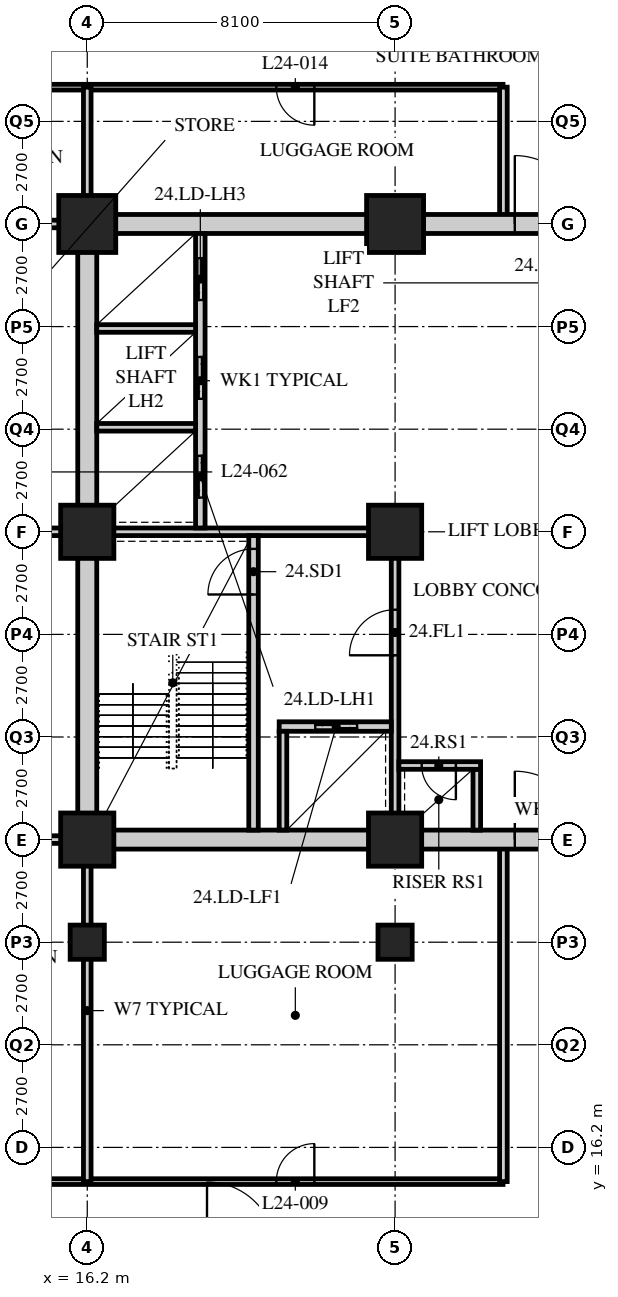
"""IFC4 building model, lengths in metres.
Left out: names, types, materials, properties, quantities, classifications, styles, units other than length and angle.
Written with IfcOpenShell. Run it as: python <this file> out.ifc"""

import sys

from ifc_helpers import new_model, si_unit, direction, frame, frame_2d, origin, origin_2d, place, context, subcontext, project, spatial, rectangle, hollow_rectangle, extrude, element, fill, save


model = new_model("IFC4")
c1 = context("Model", 3, precision=1e-05, world=origin(), true_north=direction((0.0, 1.0)))
c2 = subcontext(c1, "Body", "Model", "MODEL_VIEW")
j1 = project(units=[si_unit("LENGTHUNIT", "METRE"), si_unit("PLANEANGLEUNIT", "RADIAN")], contexts=[c1])
p1 = place(None, origin())
s1 = spatial("IfcSite", under=j1, at=p1, CompositionType="ELEMENT")
p2 = place(p1, origin())
s2 = spatial("IfcBuilding", under=s1, at=p2, CompositionType="ELEMENT")
p3 = place(p2, frame((0.0, 0.0, 98.0)))
s3 = spatial("IfcBuildingStorey", under=s2, at=p3, CompositionType="ELEMENT", Elevation=98.0)
p4 = place(p3, frame((16.2, 21.6, 0.0), z_axis=(0.0, 0.0, 1.0), x_axis=(1.0, 0.0, 0.0)))
e1 = element("IfcColumn", 1, at=p4, inside=s3, PredefinedType="COLUMN", context=c2, shape_type="SweptSolid", body=[
    extrude(hollow_rectangle(XDim=0.9, YDim=0.9, WallThickness=0.1, at=origin_2d()), origin(), (0.0, 0.0, 1.0), 5.4),
])
for number, where, z_axis, x_axis in (
    (2, (16.2, 24.3, 0.0), (0.0, 0.0, 1.0), (1.0, 0.0, 0.0)),
    (3, (16.2, 32.4, 0.0), (0.0, 0.0, 1.0), (1.0, 0.0, 0.0)),
):
    element("IfcColumn", number, at=place(p3, frame(where, z_axis=z_axis, x_axis=x_axis)), inside=s3, PredefinedType="COLUMN", context=c2, shape_type="SweptSolid", body=[
        extrude(hollow_rectangle(XDim=1.4, YDim=1.4, WallThickness=0.12, at=origin_2d()), origin(), (0.0, 0.0, 1.0), 5.4),
    ])
p5 = place(p3, frame((16.2, 40.5, 0.0), z_axis=(0.0, 0.0, 1.0), x_axis=(1.0, 0.0, 0.0)))
e4 = element("IfcColumn", 4, at=p5, inside=s3, PredefinedType="COLUMN", context=c2, shape_type="SweptSolid", body=[
    extrude(hollow_rectangle(XDim=1.5, YDim=1.5, WallThickness=0.13, at=origin_2d()), origin(), (0.0, 0.0, 1.0), 5.4),
])
p6 = place(p3, frame((24.3, 21.6, 0.0), z_axis=(0.0, 0.0, 1.0), x_axis=(1.0, 0.0, 0.0)))
e5 = element("IfcColumn", 5, at=p6, inside=s3, PredefinedType="COLUMN", context=c2, shape_type="SweptSolid", body=[
    extrude(hollow_rectangle(XDim=0.9, YDim=0.9, WallThickness=0.1, at=origin_2d()), origin(), (0.0, 0.0, 1.0), 5.4),
])
for number, where, z_axis, x_axis in (
    (6, (24.3, 24.3, 0.0), (0.0, 0.0, 1.0), (1.0, 0.0, 0.0)),
    (7, (24.3, 32.4, 0.0), (0.0, 0.0, 1.0), (1.0, 0.0, 0.0)),
):
    element("IfcColumn", number, at=place(p3, frame(where, z_axis=z_axis, x_axis=x_axis)), inside=s3, PredefinedType="COLUMN", context=c2, shape_type="SweptSolid", body=[
        extrude(hollow_rectangle(XDim=1.4, YDim=1.4, WallThickness=0.12, at=origin_2d()), origin(), (0.0, 0.0, 1.0), 5.4),
    ])
p7 = place(p3, frame((24.3, 40.5, 0.0), z_axis=(0.0, 0.0, 1.0), x_axis=(1.0, 0.0, 0.0)))
e8 = element("IfcColumn", 8, at=p7, inside=s3, PredefinedType="COLUMN", context=c2, shape_type="SweptSolid", body=[
    extrude(hollow_rectangle(XDim=1.5, YDim=1.5, WallThickness=0.13, at=origin_2d()), origin(), (0.0, 0.0, 1.0), 5.4),
])
p8 = place(p3, frame((27.14, 44.1, 0.0), z_axis=(0.0, 0.0, 1.0), x_axis=(-1.0, 0.0, 0.0)))
e9 = element("IfcWall", 9, at=p8, inside=s3, PredefinedType="PARTITIONING", context=c2, shape_type="SweptSolid", body=[
    extrude(rectangle(XDim=17.24, YDim=0.15, at=frame_2d((8.62, 0.0))), origin(), (0.0, 0.0, 1.0), 5.19),
])
p9 = place(p8, frame((13.59, 0.0, 0.0)))
e10 = element("IfcOpeningElement", 10, at=p9, cuts=e9, PredefinedType="OPENING", context=c2, shape_type="SweptSolid", body=[
    extrude(rectangle(XDim=1.0, YDim=2.1, at=frame_2d((0.5, 1.05))), frame((0.0, 0.085, 0.0), z_axis=(0.0, -1.0, 0.0), x_axis=(1.0, 0.0, 0.0)), (0.0, 0.0, 1.0), 0.17),
])
p10 = place(p8, frame((4.965, 0.0, 0.0)))
e11 = element("IfcOpeningElement", 11, at=p10, cuts=e9, PredefinedType="OPENING", context=c2, shape_type="SweptSolid", body=[
    extrude(rectangle(XDim=1.0, YDim=2.1, at=frame_2d((0.5, 1.05))), frame((0.0, 0.085, 0.0), z_axis=(0.0, -1.0, 0.0), x_axis=(1.0, 0.0, 0.0)), (0.0, 0.0, 1.0), 0.17),
])
p11 = place(p3, frame((9.9, 15.3, 0.0), z_axis=(0.0, 0.0, 1.0), x_axis=(1.0, 0.0, 0.0)))
e12 = element("IfcWall", 12, at=p11, inside=s3, PredefinedType="PARTITIONING", context=c2, shape_type="SweptSolid", body=[
    extrude(rectangle(XDim=17.24, YDim=0.15, at=frame_2d((8.62, 0.0))), origin(), (0.0, 0.0, 1.0), 5.19),
])
p12 = place(p11, frame((2.65, 0.0, 0.0)))
e13 = element("IfcOpeningElement", 13, at=p12, cuts=e12, PredefinedType="OPENING", context=c2, shape_type="SweptSolid", body=[
    extrude(rectangle(XDim=1.0, YDim=2.1, at=frame_2d((0.5, 1.05))), frame((0.0, 0.085, 0.0), z_axis=(0.0, -1.0, 0.0), x_axis=(1.0, 0.0, 0.0)), (0.0, 0.0, 1.0), 0.17),
])
p13 = place(p11, frame((11.275, 0.0, 0.0)))
e14 = element("IfcOpeningElement", 14, at=p13, cuts=e12, PredefinedType="OPENING", context=c2, shape_type="SweptSolid", body=[
    extrude(rectangle(XDim=1.0, YDim=2.1, at=frame_2d((0.5, 1.05))), frame((0.0, 0.085, 0.0), z_axis=(0.0, -1.0, 0.0), x_axis=(1.0, 0.0, 0.0)), (0.0, 0.0, 1.0), 0.17),
])
p14 = place(p3, frame((9.9, 32.4, 0.0), z_axis=(0.0, 0.0, 1.0), x_axis=(1.0, 0.0, 0.0)))
e15 = element("IfcWall", 15, at=p14, inside=s3, PredefinedType="SOLIDWALL", context=c2, shape_type="SweptSolid", body=[
    extrude(rectangle(XDim=6.3, YDim=0.2, at=frame_2d((3.15, 0.0))), origin(), (0.0, 0.0, 1.0), 5.19),
])
p15 = place(p3, frame((16.2, 15.3, 0.0), z_axis=(0.0, 0.0, 1.0), x_axis=(0.0, 1.0, 0.0)))
e16 = element("IfcWall", 16, at=p15, inside=s3, PredefinedType="SOLIDWALL", context=c2, shape_type="SweptSolid", body=[
    extrude(rectangle(XDim=9.0, YDim=0.2, at=frame_2d((4.5, 0.0))), origin(), (0.0, 0.0, 1.0), 4.49),
])
p16 = place(p3, frame((27.15, 15.3, 0.0), z_axis=(0.0, 0.0, 1.0), x_axis=(0.0, 1.0, 0.0)))
e17 = element("IfcWall", 17, at=p16, inside=s3, PredefinedType="SOLIDWALL", context=c2, shape_type="SweptSolid", body=[
    extrude(rectangle(XDim=9.0, YDim=0.2, at=frame_2d((4.5, 0.0))), origin(), (0.0, 0.0, 1.0), 5.19),
])
p17 = place(p3, frame((16.2, 40.5, 0.0), z_axis=(0.0, 0.0, 1.0), x_axis=(0.0, 1.0, 0.0)))
e18 = element("IfcWall", 18, at=p17, inside=s3, PredefinedType="SOLIDWALL", context=c2, shape_type="SweptSolid", body=[
    extrude(rectangle(XDim=3.6, YDim=0.2, at=frame_2d((1.8, 0.0))), origin(), (0.0, 0.0, 1.0), 4.49),
])
p18 = place(p3, frame((27.15, 40.5, 0.0), z_axis=(0.0, 0.0, 1.0), x_axis=(0.0, 1.0, 0.0)))
e19 = element("IfcWall", 19, at=p18, inside=s3, PredefinedType="SOLIDWALL", context=c2, shape_type="SweptSolid", body=[
    extrude(rectangle(XDim=3.6, YDim=0.2, at=frame_2d((1.8, 0.0))), origin(), (0.0, 0.0, 1.0), 5.19),
])
for number, where, z_axis, x_axis in (
    (20, (9.9, 24.3, 0.0), (0.0, 0.0, 1.0), (1.0, 0.0, 0.0)),
    (21, (9.9, 40.5, 0.0), (0.0, 0.0, 1.0), (1.0, 0.0, 0.0)),
):
    element("IfcWall", number, at=place(p3, frame(where, z_axis=z_axis, x_axis=x_axis)), inside=s3, PredefinedType="SOLIDWALL", context=c2, shape_type="SweptSolid", body=[
        extrude(rectangle(XDim=6.3, YDim=0.2, at=frame_2d((3.15, 0.0))), origin(), (0.0, 0.0, 1.0), 5.19),
    ])
p19 = place(p3, frame((15.95, 24.3, 0.0), z_axis=(0.0, 0.0, 1.0), x_axis=(1.0, 0.0, 0.0)))
e22 = element("IfcWall", 22, at=p19, inside=s3, PredefinedType="SOLIDWALL", context=c2, shape_type="SweptSolid", body=[
    extrude(rectangle(XDim=24.8, YDim=0.5, at=frame_2d((12.4, 0.0))), origin(), (0.0, 0.0, 1.0), 4.49),
])
p20 = place(p19, frame((11.5, 0.0, 0.0)))
e23 = element("IfcOpeningElement", 23, at=p20, cuts=e22, PredefinedType="OPENING", context=c2, shape_type="SweptSolid", body=[
    extrude(rectangle(XDim=1.8, YDim=2.4, at=frame_2d((0.9, 1.2))), frame((0.0, 0.26, 0.0), z_axis=(0.0, -1.0, 0.0), x_axis=(1.0, 0.0, 0.0)), (0.0, 0.0, 1.0), 0.52),
])
p21 = place(p3, frame((15.95, 40.5, 0.0), z_axis=(0.0, 0.0, 1.0), x_axis=(1.0, 0.0, 0.0)))
e24 = element("IfcWall", 24, at=p21, inside=s3, PredefinedType="SOLIDWALL", context=c2, shape_type="SweptSolid", body=[
    extrude(rectangle(XDim=24.8, YDim=0.5, at=frame_2d((12.4, 0.0))), origin(), (0.0, 0.0, 1.0), 4.49),
])
p22 = place(p21, frame((11.5, 0.0, 0.0)))
e25 = element("IfcOpeningElement", 25, at=p22, cuts=e24, PredefinedType="OPENING", context=c2, shape_type="SweptSolid", body=[
    extrude(rectangle(XDim=1.8, YDim=2.4, at=frame_2d((0.9, 1.2))), frame((0.0, 0.26, 0.0), z_axis=(0.0, -1.0, 0.0), x_axis=(1.0, 0.0, 0.0)), (0.0, 0.0, 1.0), 0.52),
])
p23 = place(p3, frame((16.2, 24.55, 0.0), z_axis=(0.0, 0.0, 1.0), x_axis=(0.0, 1.0, 0.0)))
e26 = element("IfcWall", 26, at=p23, inside=s3, PredefinedType="SOLIDWALL", context=c2, shape_type="SweptSolid", body=[
    extrude(rectangle(XDim=15.7, YDim=0.5, at=frame_2d((7.85, 0.0))), origin(), (0.0, 0.0, 1.0), 4.49),
])
p24 = place(p3, frame((16.45, 32.4, 0.0), z_axis=(0.0, 0.0, 1.0), x_axis=(1.0, 0.0, 0.0)))
e27 = element("IfcWall", 27, at=p24, inside=s3, PredefinedType="SOLIDWALL", context=c2, shape_type="SweptSolid", body=[
    extrude(rectangle(XDim=7.95, YDim=0.2, at=frame_2d((3.975, 0.0))), origin(), (0.0, 0.0, 1.0), 4.578),
])
p25 = place(p3, frame((24.3, 24.55, 0.0), z_axis=(0.0, 0.0, 1.0), x_axis=(0.0, 1.0, 0.0)))
e28 = element("IfcWall", 28, at=p25, inside=s3, PredefinedType="SOLIDWALL", context=c2, shape_type="SweptSolid", body=[
    extrude(rectangle(XDim=7.75, YDim=0.2, at=frame_2d((3.875, 0.0))), origin(), (0.0, 0.0, 1.0), 4.578),
])
p26 = place(p25, frame((4.6, 0.0, 0.0)))
e29 = element("IfcOpeningElement", 29, at=p26, cuts=e28, PredefinedType="OPENING", context=c2, shape_type="SweptSolid", body=[
    extrude(rectangle(XDim=1.2, YDim=2.1, at=frame_2d((0.6, 1.05))), frame((0.0, 0.11, 0.0), z_axis=(0.0, -1.0, 0.0), x_axis=(1.0, 0.0, 0.0)), (0.0, 0.0, 1.0), 0.22),
])
p27 = place(p3, frame((20.575, 24.55, 0.0), z_axis=(0.0, 0.0, 1.0), x_axis=(0.0, 1.0, 0.0)))
e30 = element("IfcWall", 30, at=p27, inside=s3, PredefinedType="SOLIDWALL", context=c2, shape_type="SweptSolid", body=[
    extrude(rectangle(XDim=7.75, YDim=0.25, at=frame_2d((3.875, 0.0))), origin(), (0.0, 0.0, 1.0), 5.19),
])
p28 = place(p27, frame((6.2, 0.0, 0.0)))
e31 = element("IfcOpeningElement", 31, at=p28, cuts=e30, PredefinedType="OPENING", context=c2, shape_type="SweptSolid", body=[
    extrude(rectangle(XDim=1.2, YDim=2.1, at=frame_2d((0.6, 1.05))), frame((0.0, 0.135, 0.0), z_axis=(0.0, -1.0, 0.0), x_axis=(1.0, 0.0, 0.0)), (0.0, 0.0, 1.0), 0.27),
])
p29 = place(p3, frame((21.25, 27.275, 0.0), z_axis=(0.0, 0.0, 1.0), x_axis=(1.0, 0.0, 0.0)))
e32 = element("IfcWall", 32, at=p29, inside=s3, PredefinedType="SOLIDWALL", context=c2, shape_type="SweptSolid", body=[
    extrude(rectangle(XDim=2.95, YDim=0.25, at=frame_2d((1.475, 0.0))), origin(), (0.0, 0.0, 1.0), 5.19),
])
p30 = place(p29, frame((0.95, 0.0, 0.0)))
e33 = element("IfcOpeningElement", 33, at=p30, cuts=e32, PredefinedType="OPENING", context=c2, shape_type="SweptSolid", body=[
    extrude(rectangle(XDim=1.1, YDim=2.4, at=frame_2d((0.55, 1.2))), frame((0.0, 0.135, 0.0), z_axis=(0.0, -1.0, 0.0), x_axis=(1.0, 0.0, 0.0)), (0.0, 0.0, 1.0), 0.27),
])
p31 = place(p3, frame((21.35, 24.55, 0.0), z_axis=(0.0, 0.0, 1.0), x_axis=(0.0, 1.0, 0.0)))
e34 = element("IfcWall", 34, at=p31, inside=s3, PredefinedType="SOLIDWALL", context=c2, shape_type="SweptSolid", body=[
    extrude(rectangle(XDim=2.6, YDim=0.2, at=frame_2d((1.3, 0.0))), origin(), (0.0, 0.0, 1.0), 5.19),
])
p32 = place(p3, frame((19.175, 32.5, 0.0), z_axis=(0.0, 0.0, 1.0), x_axis=(0.0, 1.0, 0.0)))
e35 = element("IfcWall", 35, at=p32, inside=s3, PredefinedType="SOLIDWALL", context=c2, shape_type="SweptSolid", body=[
    extrude(rectangle(XDim=7.75, YDim=0.25, at=frame_2d((3.875, 0.0))), origin(), (0.0, 0.0, 1.0), 5.19),
])
p33 = place(p32, frame((0.8, 0.0, 0.0)))
e36 = element("IfcOpeningElement", 36, at=p33, cuts=e35, PredefinedType="OPENING", context=c2, shape_type="SweptSolid", body=[
    extrude(rectangle(XDim=1.1, YDim=2.4, at=frame_2d((0.55, 1.2))), frame((0.0, 0.135, 0.0), z_axis=(0.0, -1.0, 0.0), x_axis=(1.0, 0.0, 0.0)), (0.0, 0.0, 1.0), 0.27),
])
p34 = place(p32, frame((3.4, 0.0, 0.0)))
e37 = element("IfcOpeningElement", 37, at=p34, cuts=e35, PredefinedType="OPENING", context=c2, shape_type="SweptSolid", body=[
    extrude(rectangle(XDim=1.1, YDim=2.4, at=frame_2d((0.55, 1.2))), frame((0.0, 0.135, 0.0), z_axis=(0.0, -1.0, 0.0), x_axis=(1.0, 0.0, 0.0)), (0.0, 0.0, 1.0), 0.27),
])
p35 = place(p32, frame((6.0, 0.0, 0.0)))
e38 = element("IfcOpeningElement", 38, at=p35, cuts=e35, PredefinedType="OPENING", context=c2, shape_type="SweptSolid", body=[
    extrude(rectangle(XDim=1.1, YDim=2.4, at=frame_2d((0.55, 1.2))), frame((0.0, 0.135, 0.0), z_axis=(0.0, -1.0, 0.0), x_axis=(1.0, 0.0, 0.0)), (0.0, 0.0, 1.0), 0.27),
])
for number, where, z_axis, x_axis in (
    (39, (16.45, 35.15, 0.0), (0.0, 0.0, 1.0), (1.0, 0.0, 0.0)),
    (40, (16.45, 37.75, 0.0), (0.0, 0.0, 1.0), (1.0, 0.0, 0.0)),
):
    element("IfcWall", number, at=place(p3, frame(where, z_axis=z_axis, x_axis=x_axis)), inside=s3, PredefinedType="SOLIDWALL", context=c2, shape_type="SweptSolid", body=[
        extrude(rectangle(XDim=2.6, YDim=0.2, at=frame_2d((1.3, 0.0))), origin(), (0.0, 0.0, 1.0), 5.19),
    ])
p36 = place(p3, frame((26.45, 24.55, 0.0), z_axis=(0.0, 0.0, 1.0), x_axis=(0.0, 1.0, 0.0)))
e41 = element("IfcWall", 41, at=p36, inside=s3, PredefinedType="SOLIDWALL", context=c2, shape_type="SweptSolid", body=[
    extrude(rectangle(XDim=1.6, YDim=0.2, at=frame_2d((0.8, 0.0))), origin(), (0.0, 0.0, 1.0), 5.19),
])
p37 = place(p3, frame((24.4, 26.25, 0.0), z_axis=(0.0, 0.0, 1.0), x_axis=(1.0, 0.0, 0.0)))
e42 = element("IfcWall", 42, at=p37, inside=s3, PredefinedType="SOLIDWALL", context=c2, shape_type="SweptSolid", body=[
    extrude(rectangle(XDim=2.15, YDim=0.2, at=frame_2d((1.075, 0.0))), origin(), (0.0, 0.0, 1.0), 5.19),
])
p38 = place(p37, frame((0.6, 0.0, 0.0)))
e43 = element("IfcOpeningElement", 43, at=p38, cuts=e42, PredefinedType="OPENING", context=c2, shape_type="SweptSolid", body=[
    extrude(rectangle(XDim=0.9, YDim=2.1, at=frame_2d((0.45, 1.05))), frame((0.0, 0.11, 0.0), z_axis=(0.0, -1.0, 0.0), x_axis=(1.0, 0.0, 0.0)), (0.0, 0.0, 1.0), 0.22),
])
p39 = place(p13, origin())
e44 = element("IfcDoor", 44, at=p39, inside=s3, OperationType="SINGLE_SWING_RIGHT", PredefinedType="DOOR", context=c2, shape_type="SweptSolid", body=[
    extrude(rectangle(XDim=1.0, YDim=2.1, at=frame_2d((0.5, 1.05))), frame((0.0, 0.025, 0.0), z_axis=(0.0, -1.0, 0.0), x_axis=(1.0, 0.0, 0.0)), (0.0, 0.0, 1.0), 0.05),
])
fill(e14, e44)
p40 = place(p10, origin())
e45 = element("IfcDoor", 45, at=p40, inside=s3, OperationType="SINGLE_SWING_LEFT", PredefinedType="DOOR", context=c2, shape_type="SweptSolid", body=[
    extrude(rectangle(XDim=1.0, YDim=2.1, at=frame_2d((0.5, 1.05))), frame((0.0, 0.025, 0.0), z_axis=(0.0, -1.0, 0.0), x_axis=(1.0, 0.0, 0.0)), (0.0, 0.0, 1.0), 0.05),
])
fill(e11, e45)
p41 = place(p28, origin())
e46 = element("IfcDoor", 46, at=p41, inside=s3, OperationType="SINGLE_SWING_LEFT", PredefinedType="DOOR", context=c2, shape_type="SweptSolid", body=[
    extrude(rectangle(XDim=1.2, YDim=2.1, at=frame_2d((0.6, 1.05))), frame((0.0, 0.025, 0.0), z_axis=(0.0, -1.0, 0.0), x_axis=(1.0, 0.0, 0.0)), (0.0, 0.0, 1.0), 0.05),
])
fill(e31, e46)
p42 = place(p26, origin())
e47 = element("IfcDoor", 47, at=p42, inside=s3, OperationType="SINGLE_SWING_LEFT", PredefinedType="DOOR", context=c2, shape_type="SweptSolid", body=[
    extrude(rectangle(XDim=1.2, YDim=2.1, at=frame_2d((0.6, 1.05))), frame((0.0, 0.025, 0.0), z_axis=(0.0, -1.0, 0.0), x_axis=(1.0, 0.0, 0.0)), (0.0, 0.0, 1.0), 0.05),
])
fill(e29, e47)
p43 = place(p38, origin())
e48 = element("IfcDoor", 48, at=p43, inside=s3, OperationType="SINGLE_SWING_LEFT", PredefinedType="DOOR", context=c2, shape_type="SweptSolid", body=[
    extrude(rectangle(XDim=0.9, YDim=2.1, at=frame_2d((0.45, 1.05))), frame((0.0, 0.025, 0.0), z_axis=(0.0, -1.0, 0.0), x_axis=(1.0, 0.0, 0.0)), (0.0, 0.0, 1.0), 0.05),
])
fill(e43, e48)
p44 = place(p33, origin())
e49 = element("IfcDoor", 49, at=p44, inside=s3, OperationType="DOUBLE_DOOR_SLIDING", PredefinedType="DOOR", context=c2, shape_type="SweptSolid", body=[
    extrude(rectangle(XDim=1.1, YDim=2.4, at=frame_2d((0.55, 1.2))), frame((0.0, 0.025, 0.0), z_axis=(0.0, -1.0, 0.0), x_axis=(1.0, 0.0, 0.0)), (0.0, 0.0, 1.0), 0.05),
])
fill(e36, e49)
p45 = place(p34, origin())
e50 = element("IfcDoor", 50, at=p45, inside=s3, OperationType="DOUBLE_DOOR_SLIDING", PredefinedType="DOOR", context=c2, shape_type="SweptSolid", body=[
    extrude(rectangle(XDim=1.1, YDim=2.4, at=frame_2d((0.55, 1.2))), frame((0.0, 0.025, 0.0), z_axis=(0.0, -1.0, 0.0), x_axis=(1.0, 0.0, 0.0)), (0.0, 0.0, 1.0), 0.05),
])
fill(e37, e50)
p46 = place(p35, origin())
e51 = element("IfcDoor", 51, at=p46, inside=s3, OperationType="DOUBLE_DOOR_SLIDING", PredefinedType="DOOR", context=c2, shape_type="SweptSolid", body=[
    extrude(rectangle(XDim=1.1, YDim=2.4, at=frame_2d((0.55, 1.2))), frame((0.0, 0.025, 0.0), z_axis=(0.0, -1.0, 0.0), x_axis=(1.0, 0.0, 0.0)), (0.0, 0.0, 1.0), 0.05),
])
fill(e38, e51)
p47 = place(p30, origin())
e52 = element("IfcDoor", 52, at=p47, inside=s3, OperationType="DOUBLE_DOOR_SLIDING", PredefinedType="DOOR", context=c2, shape_type="SweptSolid", body=[
    extrude(rectangle(XDim=1.1, YDim=2.4, at=frame_2d((0.55, 1.2))), frame((0.0, 0.025, 0.0), z_axis=(0.0, -1.0, 0.0), x_axis=(1.0, 0.0, 0.0)), (0.0, 0.0, 1.0), 0.05),
])
fill(e33, e52)
p48 = place(p20, origin())
e53 = element("IfcDoor", 53, at=p48, inside=s3, OperationType="DOUBLE_DOOR_SINGLE_SWING", PredefinedType="DOOR", context=c2, shape_type="SweptSolid", body=[
    extrude(rectangle(XDim=1.8, YDim=2.4, at=frame_2d((0.9, 1.2))), frame((0.0, 0.025, 0.0), z_axis=(0.0, -1.0, 0.0), x_axis=(1.0, 0.0, 0.0)), (0.0, 0.0, 1.0), 0.05),
])
fill(e23, e53)
p49 = place(p22, origin())
e54 = element("IfcDoor", 54, at=p49, inside=s3, OperationType="DOUBLE_DOOR_SINGLE_SWING", PredefinedType="DOOR", context=c2, shape_type="SweptSolid", body=[
    extrude(rectangle(XDim=1.8, YDim=2.4, at=frame_2d((0.9, 1.2))), frame((0.0, 0.025, 0.0), z_axis=(0.0, -1.0, 0.0), x_axis=(1.0, 0.0, 0.0)), (0.0, 0.0, 1.0), 0.05),
])
fill(e25, e54)
save(model, sys.argv[1])
